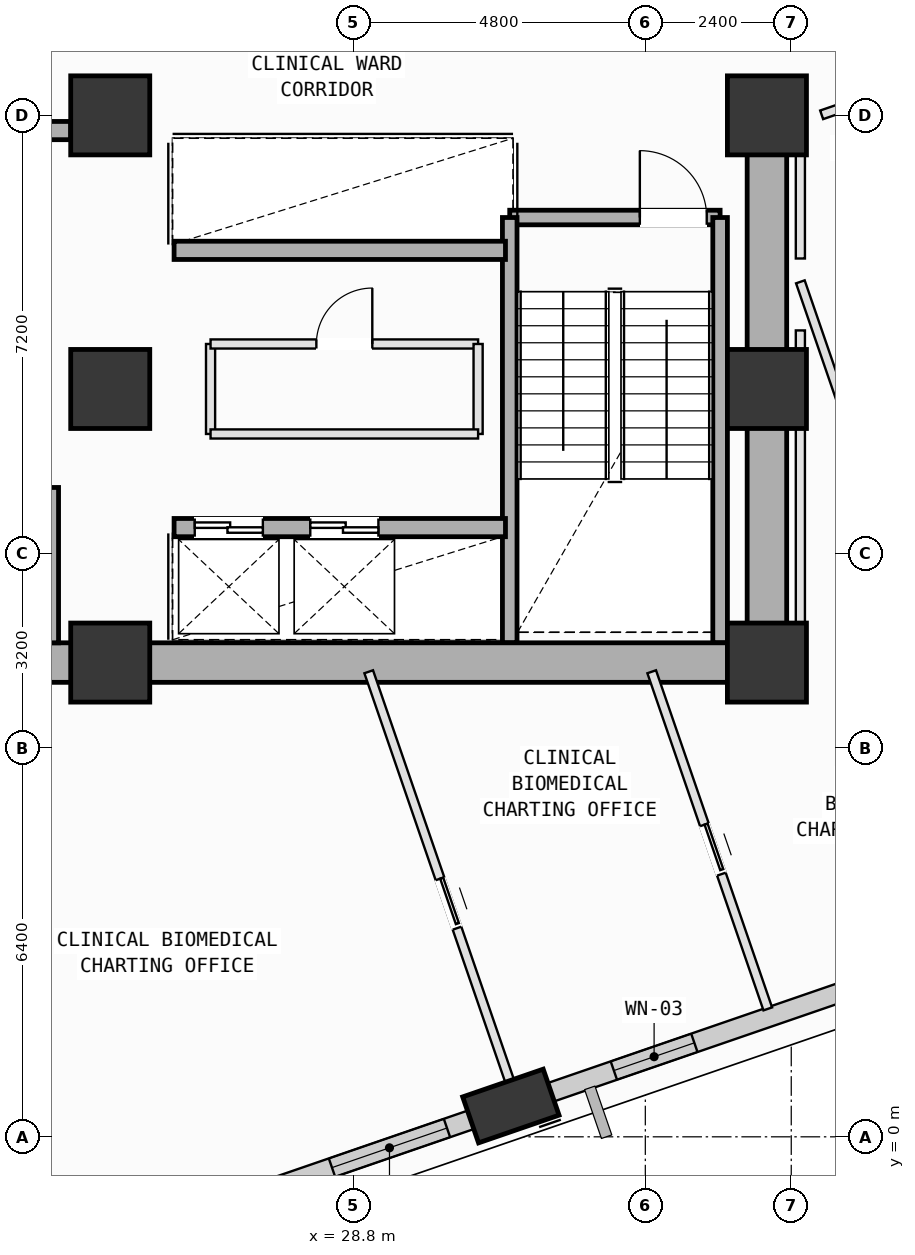
"""IFC4 building model, lengths in metres.
Left out: names, types, materials, properties, quantities, classifications, styles, units other than length and angle.
Written with IfcOpenShell. Run it as: python <this file> out.ifc"""

import sys

from ifc_helpers import new_model, si_unit, direction, frame, frame_2d, origin, origin_2d, place, context, subcontext, project, spatial, rectangle, extrude, element, fill, save


model = new_model("IFC4")
c1 = context("Model", 3, precision=1e-05, world=origin(), true_north=direction((0.0, 1.0)))
c2 = subcontext(c1, "Body", "Model", "MODEL_VIEW")
j1 = project(units=[si_unit("LENGTHUNIT", "METRE"), si_unit("PLANEANGLEUNIT", "RADIAN")], contexts=[c1])
p1 = place(None, origin())
s1 = spatial("IfcSite", under=j1, at=p1, CompositionType="ELEMENT")
p2 = place(p1, origin())
s2 = spatial("IfcBuilding", under=s1, at=p2, CompositionType="ELEMENT")
p3 = place(p2, frame((0.0, 0.0, 104.4)))
s3 = spatial("IfcBuildingStorey", under=s2, at=p3, CompositionType="ELEMENT", Elevation=104.4)
for number, where, z_axis, x_axis in (
    (1, (24.8, 7.8, 0.0), (0.0, 0.0, 1.0), (1.0, 0.0, 0.0)),
    (2, (24.8, 12.3, 0.0), (0.0, 0.0, 1.0), (1.0, 0.0, 0.0)),
    (3, (24.8, 16.8, 0.0), (0.0, 0.0, 1.0), (1.0, 0.0, 0.0)),
    (4, (35.6, 7.8, 0.0), (0.0, 0.0, 1.0), (1.0, 0.0, 0.0)),
    (5, (35.6, 12.3, 0.0), (0.0, 0.0, 1.0), (1.0, 0.0, 0.0)),
    (6, (35.6, 16.8, 0.0), (0.0, 0.0, 1.0), (1.0, 0.0, 0.0)),
):
    element("IfcColumn", number, at=place(p3, frame(where, z_axis=z_axis, x_axis=x_axis)), inside=s3, PredefinedType="COLUMN", context=c2, shape_type="SweptSolid", body=[
        extrude(rectangle(XDim=1.3, YDim=1.3, at=origin_2d()), origin(), (0.0, 0.0, 1.0), 4.0),
    ])
p4 = place(p3, frame((31.389, 0.507, 0.002), z_axis=(0.100228414923, -0.008327042356, 0.994929608167), x_axis=(-0.244520655931, 0.969091071717, 0.032743603058)))
e7 = element("IfcColumn", 7, at=p4, inside=s3, PredefinedType="COLUMN", context=c2, shape_type="SweptSolid", body=[
    extrude(rectangle(XDim=1.4, YDim=0.8, at=origin_2d()), origin(), (0.0, 0.0, 1.0), 4.017),
])
p5 = place(p3, frame((31.101, 0.407, 0.0), z_axis=(0.0, 0.0, 1.0), x_axis=(-0.945511895629, -0.325587553854, 0.0)))
e8 = element("IfcWall", 8, at=p5, inside=s3, PredefinedType="SOLIDWALL", context=c2, shape_type="SweptSolid", body=[
    extrude(rectangle(XDim=6.234, YDim=0.32, at=frame_2d((3.117, 0.0))), origin(), (0.0, 0.0, 1.0), 3.165),
])
p6 = place(p5, frame((0.807, 0.0, 0.75)))
e9 = element("IfcOpeningElement", 9, at=p6, cuts=e8, PredefinedType="OPENING", context=c2, shape_type="SweptSolid", body=[
    extrude(rectangle(XDim=2.0, YDim=1.95, at=frame_2d((1.0, 0.975))), frame((0.0, 0.17, 0.0), z_axis=(0.0, -1.0, 0.0), x_axis=(1.0, 0.0, 0.0)), (0.0, 0.0, 1.0), 0.34),
])
p7 = place(p3, frame((37.902, 2.749, 0.0), z_axis=(0.0, 0.0, 1.0), x_axis=(-0.945529854609, -0.32553539599, 0.0)))
e10 = element("IfcWall", 10, at=p7, inside=s3, PredefinedType="SOLIDWALL", context=c2, shape_type="SweptSolid", body=[
    extrude(rectangle(XDim=6.214, YDim=0.32, at=frame_2d((3.107, 0.0))), origin(), (0.0, 0.0, 1.0), 3.165),
])
p8 = place(p7, frame((3.698, 0.0, 0.75)))
e11 = element("IfcOpeningElement", 11, at=p8, cuts=e10, PredefinedType="OPENING", context=c2, shape_type="SweptSolid", body=[
    extrude(rectangle(XDim=1.4, YDim=1.85, at=frame_2d((0.7, 0.925))), frame((0.0, 0.17, 0.0), z_axis=(0.0, -1.0, 0.0), x_axis=(1.0, 0.0, 0.0)), (0.0, 0.0, 1.0), 0.34),
])
p9 = place(p3, frame((31.37, 15.12, 0.0), z_axis=(0.0, 0.0, 1.0), x_axis=(1.0, 0.0, 0.0)))
e12 = element("IfcWall", 12, at=p9, inside=s3, PredefinedType="SOLIDWALL", context=c2, shape_type="SweptSolid", body=[
    extrude(rectangle(XDim=3.46, YDim=0.24, at=frame_2d((1.73, 0.0))), origin(), (0.0, 0.0, 1.0), 3.78),
])
p10 = place(p9, frame((2.14, 0.0, 0.0)))
e13 = element("IfcOpeningElement", 13, at=p10, cuts=e12, PredefinedType="OPENING", context=c2, shape_type="SweptSolid", body=[
    extrude(rectangle(XDim=1.1, YDim=2.15, at=frame_2d((0.55, 1.075))), frame((0.0, 0.13, 0.0), z_axis=(0.0, -1.0, 0.0), x_axis=(1.0, 0.0, 0.0)), (0.0, 0.0, 1.0), 0.26),
])
for number, where, z_axis, x_axis in (
    (14, (34.83, 15.12, 0.0), (0.0, 0.0, 1.0), (0.0, -1.0, 0.0)),
    (15, (31.37, 8.125, 0.0), (0.0, 0.0, 1.0), (0.0, 1.0, 0.0)),
):
    element("IfcWall", number, at=place(p3, frame(where, z_axis=z_axis, x_axis=x_axis)), inside=s3, PredefinedType="SOLIDWALL", context=c2, shape_type="SweptSolid", body=[
        extrude(rectangle(XDim=6.995, YDim=0.24, at=frame_2d((3.498, 0.0))), origin(), (0.0, 0.0, 1.0), 3.78),
    ])
for number, where, z_axis, x_axis in (
    (16, (14.0, 7.8, 0.0), (0.0, 0.0, 1.0), (1.0, 0.0, 0.0)),
    (17, (24.8, 7.8, 0.0), (0.0, 0.0, 1.0), (1.0, 0.0, 0.0)),
):
    element("IfcWall", number, at=place(p3, frame(where, z_axis=z_axis, x_axis=x_axis)), inside=s3, PredefinedType="SHEAR", context=c2, shape_type="SweptSolid", body=[
        extrude(rectangle(XDim=10.8, YDim=0.65, at=frame_2d((5.4, 0.0))), origin(), (0.0, 0.0, 1.0), 3.78),
    ])
p11 = place(p3, frame((35.6, 7.8, 0.0), z_axis=(0.0, 0.0, 1.0), x_axis=(0.0, 1.0, 0.0)))
e18 = element("IfcWall", 18, at=p11, inside=s3, PredefinedType="SHEAR", context=c2, shape_type="SweptSolid", body=[
    extrude(rectangle(XDim=9.0, YDim=0.65, at=frame_2d((4.5, 0.0))), origin(), (0.0, 0.0, 1.0), 3.78),
])
p12 = place(p3, frame((19.85, 16.55, 0.0), z_axis=(0.0, 0.0, 1.0), x_axis=(1.0, 0.0, 0.0)))
e19 = element("IfcWall", 19, at=p12, inside=s3, PredefinedType="SOLIDWALL", context=c2, shape_type="SweptSolid", body=[
    extrude(rectangle(XDim=4.3, YDim=0.3, at=frame_2d((2.15, 0.0))), origin(), (0.0, 0.0, 1.0), 3.78),
])
p13 = place(p12, frame((0.475, 0.0, 0.0)))
e20 = element("IfcOpeningElement", 20, at=p13, cuts=e19, PredefinedType="OPENING", context=c2, shape_type="SweptSolid", body=[
    extrude(rectangle(XDim=1.25, YDim=2.18, at=frame_2d((0.625, 1.09))), frame((0.0, 0.16, 0.0), z_axis=(0.0, -1.0, 0.0), x_axis=(1.0, 0.0, 0.0)), (0.0, 0.0, 1.0), 0.32),
])
p14 = place(p12, frame((2.49, 0.0, 0.0)))
e21 = element("IfcOpeningElement", 21, at=p14, cuts=e19, PredefinedType="OPENING", context=c2, shape_type="SweptSolid", body=[
    extrude(rectangle(XDim=1.02, YDim=2.12, at=frame_2d((0.51, 1.06))), frame((0.0, 0.16, 0.0), z_axis=(0.0, -1.0, 0.0), x_axis=(1.0, 0.0, 0.0)), (0.0, 0.0, 1.0), 0.32),
])
p15 = place(p3, frame((23.8, 8.125, 0.0), z_axis=(0.0, 0.0, 1.0), x_axis=(0.0, 1.0, 0.0)))
e22 = element("IfcWall", 22, at=p15, inside=s3, PredefinedType="SOLIDWALL", context=c2, shape_type="SweptSolid", body=[
    extrude(rectangle(XDim=2.555, YDim=0.3, at=frame_2d((1.277, 0.0))), origin(), (0.0, 0.0, 1.0), 3.78),
])
p16 = place(p3, frame((25.85, 10.02, 0.0), z_axis=(0.0, 0.0, 1.0), x_axis=(1.0, 0.0, 0.0)))
e23 = element("IfcWall", 23, at=p16, inside=s3, PredefinedType="SOLIDWALL", context=c2, shape_type="SweptSolid", body=[
    extrude(rectangle(XDim=5.45, YDim=0.3, at=frame_2d((2.725, 0.0))), origin(), (0.0, 0.0, 1.0), 3.78),
])
p17 = place(p16, frame((0.34, 0.0, 0.0)))
e24 = element("IfcOpeningElement", 24, at=p17, cuts=e23, PredefinedType="OPENING", context=c2, shape_type="SweptSolid", body=[
    extrude(rectangle(XDim=1.12, YDim=2.15, at=frame_2d((0.56, 1.075))), frame((0.0, 0.16, 0.0), z_axis=(0.0, -1.0, 0.0), x_axis=(1.0, 0.0, 0.0)), (0.0, 0.0, 1.0), 0.32),
])
p18 = place(p16, frame((2.24, 0.0, 0.0)))
e25 = element("IfcOpeningElement", 25, at=p18, cuts=e23, PredefinedType="OPENING", context=c2, shape_type="SweptSolid", body=[
    extrude(rectangle(XDim=1.12, YDim=2.15, at=frame_2d((0.56, 1.075))), frame((0.0, 0.16, 0.0), z_axis=(0.0, -1.0, 0.0), x_axis=(1.0, 0.0, 0.0)), (0.0, 0.0, 1.0), 0.32),
])
p19 = place(p3, frame((25.85, 14.58, 0.0), z_axis=(0.0, 0.0, 1.0), x_axis=(1.0, 0.0, 0.0)))
e26 = element("IfcWall", 26, at=p19, inside=s3, PredefinedType="SOLIDWALL", context=c2, shape_type="SweptSolid", body=[
    extrude(rectangle(XDim=5.45, YDim=0.3, at=frame_2d((2.725, 0.0))), origin(), (0.0, 0.0, 1.0), 3.78),
])
p20 = place(p3, frame((26.45, 11.56, 0.0), z_axis=(0.0, 0.0, 1.0), x_axis=(0.0, 1.0, 0.0)))
e27 = element("IfcWall", 27, at=p20, inside=s3, PredefinedType="PARTITIONING", context=c2, shape_type="SweptSolid", body=[
    extrude(rectangle(XDim=1.48, YDim=0.15, at=frame_2d((0.74, 0.0))), origin(), (0.0, 0.0, 1.0), 3.78),
])
p21 = place(p3, frame((26.45, 13.04, 0.0), z_axis=(0.0, 0.0, 1.0), x_axis=(1.0, 0.0, 0.0)))
e28 = element("IfcWall", 28, at=p21, inside=s3, PredefinedType="PARTITIONING", context=c2, shape_type="SweptSolid", body=[
    extrude(rectangle(XDim=4.4, YDim=0.15, at=frame_2d((2.2, 0.0))), origin(), (0.0, 0.0, 1.0), 3.78),
])
p22 = place(p21, frame((1.74, 0.0, 0.0)))
e29 = element("IfcOpeningElement", 29, at=p22, cuts=e28, PredefinedType="OPENING", context=c2, shape_type="SweptSolid", body=[
    extrude(rectangle(XDim=0.92, YDim=2.1, at=frame_2d((0.46, 1.05))), frame((0.0, 0.085, 0.0), z_axis=(0.0, -1.0, 0.0), x_axis=(1.0, 0.0, 0.0)), (0.0, 0.0, 1.0), 0.17),
])
p23 = place(p3, frame((30.85, 13.04, 0.0), z_axis=(0.0, 0.0, 1.0), x_axis=(0.0, -1.0, 0.0)))
e30 = element("IfcWall", 30, at=p23, inside=s3, PredefinedType="PARTITIONING", context=c2, shape_type="SweptSolid", body=[
    extrude(rectangle(XDim=1.48, YDim=0.15, at=frame_2d((0.74, 0.0))), origin(), (0.0, 0.0, 1.0), 3.78),
])
p24 = place(p3, frame((30.85, 11.56, 0.0), z_axis=(0.0, 0.0, 1.0), x_axis=(-1.0, 0.0, 0.0)))
e31 = element("IfcWall", 31, at=p24, inside=s3, PredefinedType="PARTITIONING", context=c2, shape_type="SweptSolid", body=[
    extrude(rectangle(XDim=4.4, YDim=0.15, at=frame_2d((2.2, 0.0))), origin(), (0.0, 0.0, 1.0), 3.78),
])
p25 = place(p3, frame((29.051, 7.649, 0.0), z_axis=(0.0, 0.0, 1.0), x_axis=(0.325547594616, -0.94552565467, 0.0)))
e32 = element("IfcWall", 32, at=p25, inside=s3, PredefinedType="PARTITIONING", context=c2, shape_type="SweptSolid", body=[
    extrude(rectangle(XDim=7.744, YDim=0.15, at=frame_2d((3.872, 0.0))), origin(), (0.0, 0.0, 1.0), 3.78),
])
p26 = place(p25, frame((3.601, 0.0, 0.0)))
e33 = element("IfcOpeningElement", 33, at=p26, cuts=e32, PredefinedType="OPENING", context=c2, shape_type="SweptSolid", body=[
    extrude(rectangle(XDim=0.86, YDim=2.06, at=frame_2d((0.43, 1.03))), frame((0.0, 0.085, 0.0), z_axis=(0.0, -1.0, 0.0), x_axis=(1.0, 0.0, 0.0)), (0.0, 0.0, 1.0), 0.17),
])
p27 = place(p3, frame((33.705, 7.649, 0.0), z_axis=(0.0, 0.0, 1.0), x_axis=(0.32551721058, -0.945536115448, 0.0)))
e34 = element("IfcWall", 34, at=p27, inside=s3, PredefinedType="PARTITIONING", context=c2, shape_type="SweptSolid", body=[
    extrude(rectangle(XDim=5.864, YDim=0.15, at=frame_2d((2.932, 0.0))), origin(), (0.0, 0.0, 1.0), 3.78),
])
p28 = place(p27, frame((2.661, 0.0, 0.0)))
e35 = element("IfcOpeningElement", 35, at=p28, cuts=e34, PredefinedType="OPENING", context=c2, shape_type="SweptSolid", body=[
    extrude(rectangle(XDim=0.86, YDim=2.06, at=frame_2d((0.43, 1.03))), frame((0.0, 0.085, 0.0), z_axis=(0.0, -1.0, 0.0), x_axis=(1.0, 0.0, 0.0)), (0.0, 0.0, 1.0), 0.17),
])
p29 = place(p3, frame((36.15, 14.062, 0.0), z_axis=(0.0, 0.0, 1.0), x_axis=(0.325568871933, -0.945518328552, 0.0)))
e36 = element("IfcWall", 36, at=p29, inside=s3, PredefinedType="PARTITIONING", context=c2, shape_type="SweptSolid", body=[
    extrude(rectangle(XDim=11.131, YDim=0.15, at=frame_2d((5.566, 0.0))), origin(), (0.0, 0.0, 1.0), 3.78),
])
p30 = place(p29, frame((5.136, 0.0, 0.0)))
e37 = element("IfcOpeningElement", 37, at=p30, cuts=e36, PredefinedType="OPENING", context=c2, shape_type="SweptSolid", body=[
    extrude(rectangle(XDim=0.86, YDim=2.06, at=frame_2d((0.43, 1.03))), frame((0.0, 0.085, 0.0), z_axis=(0.0, -1.0, 0.0), x_axis=(1.0, 0.0, 0.0)), (0.0, 0.0, 1.0), 0.17),
])
p31 = place(p3, frame((35.6, 7.5, 0.0), z_axis=(0.0, 0.0, 1.0), x_axis=(1.0, 0.0, 0.0)))
e38 = element("IfcWall", 38, at=p31, inside=s3, PredefinedType="PARTITIONING", context=c2, shape_type="SweptSolid", body=[
    extrude(rectangle(XDim=0.55, YDim=0.15, at=frame_2d((0.275, 0.0))), origin(), (0.0, 0.0, 1.0), 2.965),
])
p32 = place(p3, frame((36.15, 7.5, 0.0), z_axis=(0.0, 0.0, 1.0), x_axis=(0.0, 1.0, 0.0)))
e39 = element("IfcWall", 39, at=p32, inside=s3, PredefinedType="PARTITIONING", context=c2, shape_type="SweptSolid", body=[
    extrude(rectangle(XDim=5.763, YDim=0.15, at=frame_2d((2.881, 0.0))), origin(), (0.0, 0.0, 1.0), 3.78),
])
p33 = place(p3, frame((36.5, 16.809, 0.0), z_axis=(0.0, 0.0, 1.0), x_axis=(0.945528180051, 0.325540259767, 0.0)))
e40 = element("IfcWall", 40, at=p33, inside=s3, PredefinedType="PARTITIONING", context=c2, shape_type="SweptSolid", body=[
    extrude(rectangle(XDim=3.274, YDim=0.15, at=frame_2d((1.637, 0.0))), origin(), (0.0, 0.0, 1.0), 2.965),
])
p34 = place(p33, frame((1.037, 0.0, 0.0)))
e41 = element("IfcOpeningElement", 41, at=p34, cuts=e40, PredefinedType="OPENING", context=c2, shape_type="SweptSolid", body=[
    extrude(rectangle(XDim=1.2, YDim=2.15, at=frame_2d((0.6, 1.075))), frame((0.0, 0.085, 0.0), z_axis=(0.0, -1.0, 0.0), x_axis=(1.0, 0.0, 0.0)), (0.0, 0.0, 1.0), 0.17),
])
p35 = place(p3, frame((36.15, 14.446, 0.0), z_axis=(0.0, 0.0, 1.0), x_axis=(0.0, 1.0, 0.0)))
e42 = element("IfcWall", 42, at=p35, inside=s3, PredefinedType="PARTITIONING", context=c2, shape_type="SweptSolid", body=[
    extrude(rectangle(XDim=2.054, YDim=0.15, at=frame_2d((1.027, 0.0))), origin(), (0.0, 0.0, 1.0), 3.78),
])
p36 = place(p6, origin())
e43 = element("IfcWindow", 43, at=p36, inside=s3, PartitioningType="SINGLE_PANEL", PredefinedType="WINDOW", context=c2, shape_type="SweptSolid", body=[
    extrude(rectangle(XDim=2.0, YDim=1.95, at=frame_2d((1.0, 0.975))), frame((0.0, 0.03, 0.0), z_axis=(0.0, -1.0, 0.0), x_axis=(1.0, 0.0, 0.0)), (0.0, 0.0, 1.0), 0.06),
])
fill(e9, e43)
p37 = place(p8, origin())
e44 = element("IfcWindow", 44, at=p37, inside=s3, PartitioningType="SINGLE_PANEL", PredefinedType="WINDOW", context=c2, shape_type="SweptSolid", body=[
    extrude(rectangle(XDim=1.4, YDim=1.85, at=frame_2d((0.7, 0.925))), frame((0.0, 0.03, 0.0), z_axis=(0.0, -1.0, 0.0), x_axis=(1.0, 0.0, 0.0)), (0.0, 0.0, 1.0), 0.06),
])
fill(e11, e44)
p38 = place(p10, origin())
e45 = element("IfcDoor", 45, at=p38, inside=s3, OperationType="SINGLE_SWING_LEFT", PredefinedType="DOOR", context=c2, shape_type="SweptSolid", body=[
    extrude(rectangle(XDim=1.1, YDim=2.15, at=frame_2d((0.55, 1.075))), frame((0.0, 0.025, 0.0), z_axis=(0.0, -1.0, 0.0), x_axis=(1.0, 0.0, 0.0)), (0.0, 0.0, 1.0), 0.05),
])
fill(e13, e45)
p39 = place(p17, origin())
e46 = element("IfcDoor", 46, at=p39, inside=s3, OperationType="DOUBLE_DOOR_SLIDING", PredefinedType="DOOR", context=c2, shape_type="SweptSolid", body=[
    extrude(rectangle(XDim=1.12, YDim=2.15, at=frame_2d((0.56, 1.075))), frame((0.0, 0.025, 0.0), z_axis=(0.0, -1.0, 0.0), x_axis=(1.0, 0.0, 0.0)), (0.0, 0.0, 1.0), 0.05),
])
fill(e24, e46)
p40 = place(p18, origin())
e47 = element("IfcDoor", 47, at=p40, inside=s3, OperationType="DOUBLE_DOOR_SLIDING", PredefinedType="DOOR", context=c2, shape_type="SweptSolid", body=[
    extrude(rectangle(XDim=1.12, YDim=2.15, at=frame_2d((0.56, 1.075))), frame((0.0, 0.025, 0.0), z_axis=(0.0, -1.0, 0.0), x_axis=(1.0, 0.0, 0.0)), (0.0, 0.0, 1.0), 0.05),
])
fill(e25, e47)
p41 = place(p22, origin())
e48 = element("IfcDoor", 48, at=p41, inside=s3, OperationType="SINGLE_SWING_RIGHT", PredefinedType="DOOR", context=c2, shape_type="SweptSolid", body=[
    extrude(rectangle(XDim=0.92, YDim=2.1, at=frame_2d((0.46, 1.05))), frame((0.0, 0.025, 0.0), z_axis=(0.0, -1.0, 0.0), x_axis=(1.0, 0.0, 0.0)), (0.0, 0.0, 1.0), 0.05),
])
fill(e29, e48)
p42 = place(p28, origin())
e49 = element("IfcDoor", 49, at=p42, inside=s3, OperationType="SLIDING_TO_LEFT", PredefinedType="DOOR", context=c2, shape_type="SweptSolid", body=[
    extrude(rectangle(XDim=0.86, YDim=2.06, at=frame_2d((0.43, 1.03))), frame((0.0, 0.025, 0.0), z_axis=(0.0, -1.0, 0.0), x_axis=(1.0, 0.0, 0.0)), (0.0, 0.0, 1.0), 0.05),
])
fill(e35, e49)
p43 = place(p26, origin())
e50 = element("IfcDoor", 50, at=p43, inside=s3, OperationType="SLIDING_TO_LEFT", PredefinedType="DOOR", context=c2, shape_type="SweptSolid", body=[
    extrude(rectangle(XDim=0.86, YDim=2.06, at=frame_2d((0.43, 1.03))), frame((0.0, 0.025, 0.0), z_axis=(0.0, -1.0, 0.0), x_axis=(1.0, 0.0, 0.0)), (0.0, 0.0, 1.0), 0.05),
])
fill(e33, e50)
save(model, sys.argv[1])
